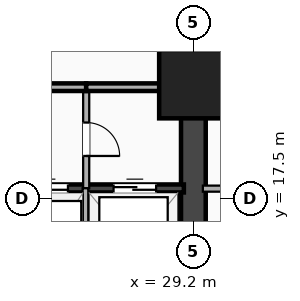
"""IFC4 building model, lengths in metres.
Left out: names, types, materials, properties, quantities, classifications, styles, units other than length and angle.
Written with IfcOpenShell. Run it as: python <this file> out.ifc"""

import sys

from ifc_helpers import new_model, si_unit, direction, frame, frame_2d, origin, origin_2d, place, context, subcontext, project, spatial, rectangle, extrude, element, fill, save


model = new_model("IFC4")
c1 = context("Model", 3, precision=1e-05, world=origin(), true_north=direction((0.0, 1.0)))
c2 = subcontext(c1, "Body", "Model", "MODEL_VIEW")
j1 = project(units=[si_unit("LENGTHUNIT", "METRE"), si_unit("PLANEANGLEUNIT", "RADIAN")], contexts=[c1])
p1 = place(None, origin())
s1 = spatial("IfcSite", under=j1, at=p1, CompositionType="ELEMENT")
p2 = place(p1, origin())
s2 = spatial("IfcBuilding", under=s1, at=p2, CompositionType="ELEMENT")
p3 = place(p2, frame((0.0, 0.0, -5.4)))
s3 = spatial("IfcBuildingStorey", under=s2, at=p3, CompositionType="ELEMENT", Elevation=-5.4)
p4 = place(p3, frame((29.2, 3.5, 0.0), z_axis=(0.0, 0.0, 1.0), x_axis=(0.0, 1.0, 0.0)))
e1 = element("IfcWall", 1, at=p4, inside=s3, PredefinedType="SHEAR", context=c2, shape_type="SweptSolid", body=[
    extrude(rectangle(XDim=16.9, YDim=0.65, at=frame_2d((8.45, 0.0))), origin(), (0.0, 0.0, 1.0), 5.05),
])
p5 = place(p4, frame((7.75, 0.0, 0.0), z_axis=(0.0, 0.0, 1.0), x_axis=(-1.0, 0.0, 0.0)))
e2 = element("IfcOpeningElement", 2, at=p5, cuts=e1, PredefinedType="OPENING", context=c2, shape_type="SweptSolid", body=[
    extrude(rectangle(XDim=1.1, YDim=2.15, at=frame_2d((0.55, 1.075))), frame((0.0, 0.335, 0.0), z_axis=(0.0, -1.0, 0.0), x_axis=(1.0, 0.0, 0.0)), (0.0, 0.0, 1.0), 0.67),
])
p6 = place(p3, frame((20.65, 17.755, 0.0), z_axis=(0.0, 0.0, 1.0), x_axis=(1.0, 0.0, 0.0)))
e3 = element("IfcWall", 3, at=p6, inside=s3, PredefinedType="SHEAR", context=c2, shape_type="SweptSolid", body=[
    extrude(rectangle(XDim=8.3, YDim=0.21, at=frame_2d((4.15, 0.0))), origin(), (0.0, 0.0, 1.0), 5.05),
])
p7 = place(p6, frame((2.2, 0.0, 0.0), z_axis=(0.0, 0.0, 1.0), x_axis=(-1.0, 0.0, 0.0)))
e4 = element("IfcOpeningElement", 4, at=p7, cuts=e3, PredefinedType="OPENING", context=c2, shape_type="SweptSolid", body=[
    extrude(rectangle(XDim=1.05, YDim=2.15, at=frame_2d((0.525, 1.075))), frame((0.0, 0.115, 0.0), z_axis=(0.0, -1.0, 0.0), x_axis=(1.0, 0.0, 0.0)), (0.0, 0.0, 1.0), 0.23),
])
p8 = place(p6, frame((4.15, 0.0, 0.0)))
e5 = element("IfcOpeningElement", 5, at=p8, cuts=e3, PredefinedType="OPENING", context=c2, shape_type="SweptSolid", body=[
    extrude(rectangle(XDim=1.1, YDim=2.18, at=frame_2d((0.55, 1.09))), frame((0.0, 0.115, 0.0), z_axis=(0.0, -1.0, 0.0), x_axis=(1.0, 0.0, 0.0)), (0.0, 0.0, 1.0), 0.23),
])
p9 = place(p6, frame((6.45, 0.0, 0.0)))
e6 = element("IfcOpeningElement", 6, at=p9, cuts=e3, PredefinedType="OPENING", context=c2, shape_type="SweptSolid", body=[
    extrude(rectangle(XDim=1.12, YDim=2.2, at=frame_2d((0.56, 1.1))), frame((0.0, 0.115, 0.0), z_axis=(0.0, -1.0, 0.0), x_axis=(1.0, 0.0, 0.0)), (0.0, 0.0, 1.0), 0.23),
])
p10 = place(p3, frame((29.2, 20.5, 0.0), z_axis=(0.0, 0.0, 1.0), x_axis=(1.0, 0.0, 0.0)))
e7 = element("IfcColumn", 7, at=p10, inside=s3, PredefinedType="COLUMN", context=c2, shape_type="SweptSolid", body=[
    extrude(rectangle(XDim=1.8, YDim=1.8, at=origin_2d()), origin(), (0.0, 0.0, 1.0), 5.05),
])
p11 = place(p3, frame((26.38, 17.76, 0.0), z_axis=(0.0, 0.0, 1.0), x_axis=(0.0, 1.0, 0.0)))
e8 = element("IfcWall", 8, at=p11, inside=s3, PredefinedType="PARTITIONING", context=c2, shape_type="SweptSolid", body=[
    extrude(rectangle(XDim=2.66, YDim=0.16, at=frame_2d((1.33, 0.0))), origin(), (0.0, 0.0, 1.0), 4.114),
])
p12 = place(p11, frame((0.85, 0.0, 0.0)))
e9 = element("IfcOpeningElement", 9, at=p12, cuts=e8, PredefinedType="OPENING", context=c2, shape_type="SweptSolid", body=[
    extrude(rectangle(XDim=0.88, YDim=2.08, at=frame_2d((0.44, 1.04))), frame((0.0, 0.09, 0.0), z_axis=(0.0, -1.0, 0.0), x_axis=(1.0, 0.0, 0.0)), (0.0, 0.0, 1.0), 0.18),
])
p13 = place(p3, frame((26.36, 14.72, 0.0), z_axis=(0.0, 0.0, 1.0), x_axis=(0.0, 1.0, 0.0)))
e10 = element("IfcWall", 10, at=p13, inside=s3, PredefinedType="PARTITIONING", context=c2, shape_type="SweptSolid", body=[
    extrude(rectangle(XDim=3.04, YDim=0.15, at=frame_2d((1.52, 0.0))), origin(), (0.0, 0.0, 1.0), 5.05),
])
p14 = place(p3, frame((20.65, 20.42, 0.0), z_axis=(0.0, 0.0, 1.0), x_axis=(1.0, 0.0, 0.0)))
e11 = element("IfcWall", 11, at=p14, inside=s3, PredefinedType="PARTITIONING", context=c2, shape_type="SweptSolid", body=[
    extrude(rectangle(XDim=5.73, YDim=0.2, at=frame_2d((2.865, 0.0))), origin(), (0.0, 0.0, 1.0), 4.114),
])
p15 = place(p14, frame((2.3, 0.0, 0.0)))
e12 = element("IfcOpeningElement", 12, at=p15, cuts=e11, PredefinedType="OPENING", context=c2, shape_type="SweptSolid", body=[
    extrude(rectangle(XDim=1.1, YDim=2.15, at=frame_2d((0.55, 1.075))), frame((0.0, 0.11, 0.0), z_axis=(0.0, -1.0, 0.0), x_axis=(1.0, 0.0, 0.0)), (0.0, 0.0, 1.0), 0.22),
])
p16 = place(p3, frame((26.38, 20.42, 0.0), z_axis=(0.0, 0.0, 1.0), x_axis=(1.0, 0.0, 0.0)))
e13 = element("IfcWall", 13, at=p16, inside=s3, PredefinedType="PARTITIONING", context=c2, shape_type="SweptSolid", body=[
    extrude(rectangle(XDim=2.82, YDim=0.2, at=frame_2d((1.41, 0.0))), origin(), (0.0, 0.0, 1.0), 4.114),
])
p17 = place(p3, frame((29.2, 20.42, 0.0), z_axis=(0.0, 0.0, 1.0), x_axis=(1.0, 0.0, 0.0)))
e14 = element("IfcWall", 14, at=p17, inside=s3, PredefinedType="PARTITIONING", context=c2, shape_type="SweptSolid", body=[
    extrude(rectangle(XDim=7.8, YDim=0.2, at=frame_2d((3.9, 0.0))), origin(), (0.0, 0.0, 1.0), 4.114),
])
p18 = place(p17, frame((3.409, 0.0, 0.0)))
e15 = element("IfcOpeningElement", 15, at=p18, cuts=e14, PredefinedType="OPENING", context=c2, shape_type="SweptSolid", body=[
    extrude(rectangle(XDim=1.1, YDim=2.15, at=frame_2d((0.55, 1.075))), frame((0.0, 0.11, 0.0), z_axis=(0.0, -1.0, 0.0), x_axis=(1.0, 0.0, 0.0)), (0.0, 0.0, 1.0), 0.22),
])
p19 = place(p3, frame((29.45, 17.75, 0.0), z_axis=(0.0, 0.0, 1.0), x_axis=(1.0, 0.0, 0.0)))
e16 = element("IfcWall", 16, at=p19, inside=s3, PredefinedType="PARTITIONING", context=c2, shape_type="SweptSolid", body=[
    extrude(rectangle(XDim=5.43, YDim=0.16, at=frame_2d((2.715, 0.0))), origin(), (0.0, 0.0, 1.0), 4.18),
])
p20 = place(p19, frame((3.175, 0.0, 0.0), z_axis=(0.0, 0.0, 1.0), x_axis=(-1.0, 0.0, 0.0)))
e17 = element("IfcOpeningElement", 17, at=p20, cuts=e16, PredefinedType="OPENING", context=c2, shape_type="SweptSolid", body=[
    extrude(rectangle(XDim=0.92, YDim=2.08, at=frame_2d((0.46, 1.04))), frame((0.0, 0.09, 0.0), z_axis=(0.0, -1.0, 0.0), x_axis=(1.0, 0.0, 0.0)), (0.0, 0.0, 1.0), 0.18),
])
p21 = place(p8, origin())
e18 = element("IfcDoor", 18, at=p21, inside=s3, OperationType="DOUBLE_DOOR_SLIDING", PredefinedType="DOOR", context=c2, shape_type="SweptSolid", body=[
    extrude(rectangle(XDim=1.1, YDim=2.18, at=frame_2d((0.55, 1.09))), frame((0.0, 0.025, 0.0), z_axis=(0.0, -1.0, 0.0), x_axis=(1.0, 0.0, 0.0)), (0.0, 0.0, 1.0), 0.05),
])
fill(e5, e18)
p22 = place(p9, origin())
e19 = element("IfcDoor", 19, at=p22, inside=s3, OperationType="DOUBLE_DOOR_SLIDING", PredefinedType="DOOR", context=c2, shape_type="SweptSolid", body=[
    extrude(rectangle(XDim=1.12, YDim=2.2, at=frame_2d((0.56, 1.1))), frame((0.0, 0.025, 0.0), z_axis=(0.0, -1.0, 0.0), x_axis=(1.0, 0.0, 0.0)), (0.0, 0.0, 1.0), 0.05),
])
fill(e6, e19)
p23 = place(p12, origin())
e20 = element("IfcDoor", 20, at=p23, inside=s3, OperationType="SINGLE_SWING_LEFT", PredefinedType="DOOR", context=c2, shape_type="SweptSolid", body=[
    extrude(rectangle(XDim=0.88, YDim=2.08, at=frame_2d((0.44, 1.04))), frame((0.0, 0.025, 0.0), z_axis=(0.0, -1.0, 0.0), x_axis=(1.0, 0.0, 0.0)), (0.0, 0.0, 1.0), 0.05),
])
fill(e9, e20)
save(model, sys.argv[1])
